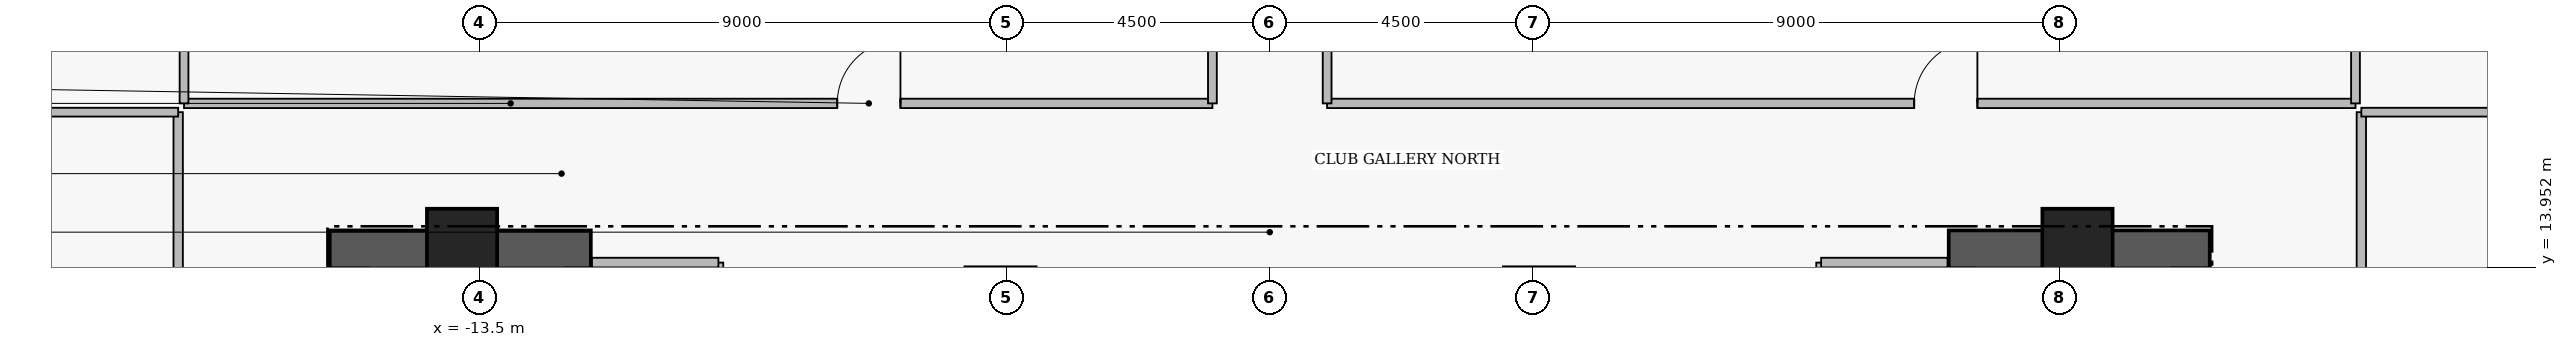
"""IFC4 building model, lengths in metres.
Left out: names, types, materials, properties, quantities, classifications, styles, units other than length and angle.
Written with IfcOpenShell. Run it as: python <this file> out.ifc"""

import sys

from ifc_helpers import new_model, si_unit, direction, frame, frame_2d, origin, origin_2d, place, context, subcontext, project, spatial, rectangle, extrude, element, fill, save


model = new_model("IFC4")
c1 = context("Model", 3, precision=1e-05, world=origin(), true_north=direction((0.0, 1.0)))
c2 = subcontext(c1, "Body", "Model", "MODEL_VIEW")
j1 = project(units=[si_unit("LENGTHUNIT", "METRE"), si_unit("PLANEANGLEUNIT", "RADIAN")], contexts=[c1])
p1 = place(None, origin())
s1 = spatial("IfcSite", under=j1, at=p1, CompositionType="ELEMENT")
p2 = place(p1, origin())
s2 = spatial("IfcBuilding", under=s1, at=p2, CompositionType="ELEMENT")
p3 = place(p2, frame((0.0, 0.0, 168.2)))
s3 = spatial("IfcBuildingStorey", under=s2, at=p3, CompositionType="ELEMENT", Elevation=168.2)
for number, where, z_axis, x_axis in (
    (1, (-16.06, 14.255, 0.0), (0.0, 0.0, 1.0), (1.0, 0.0, 0.0)),
    (2, (11.6, 14.255, 0.0), (0.0, 0.0, 1.0), (1.0, 0.0, 0.0)),
):
    element("IfcWall", number, at=place(p3, frame(where, z_axis=z_axis, x_axis=x_axis)), inside=s3, PredefinedType="SHEAR", context=c2, shape_type="SweptSolid", body=[
        extrude(rectangle(XDim=4.46, YDim=0.65, at=frame_2d((2.23, 0.0))), origin(), (0.0, 0.0, 1.0), 4.41),
    ])
for number, where, z_axis, x_axis in (
    (3, (-13.8, 14.35, 0.0), (0.0, 0.0, 1.0), (1.0, 0.0, 0.0)),
    (4, (-4.6, 13.35, 0.0), (0.0, 0.0, 1.0), (1.0, 0.0, 0.0)),
    (5, (4.6, 13.35, 0.0), (0.0, 0.0, 1.0), (1.0, 0.0, 0.0)),
    (6, (13.8, 14.35, 0.0), (0.0, 0.0, 1.0), (1.0, 0.0, 0.0)),
):
    element("IfcColumn", number, at=place(p3, frame(where, z_axis=z_axis, x_axis=x_axis)), inside=s3, PredefinedType="COLUMN", context=c2, shape_type="SweptSolid", body=[
        extrude(rectangle(XDim=1.2, YDim=1.2, at=origin_2d()), origin(), (0.0, 0.0, 1.0), 4.6),
    ])
p4 = place(p3, frame((-18.55, 16.75, 0.0), z_axis=(0.0, 0.0, 1.0), x_axis=(1.0, 0.0, 0.0)))
e7 = element("IfcWall", 7, at=p4, inside=s3, PredefinedType="PARTITIONING", context=c2, shape_type="SweptSolid", body=[
    extrude(rectangle(XDim=17.57, YDim=0.16, at=frame_2d((8.785, 0.0))), origin(), (0.0, 0.0, 1.0), 3.974),
])
p5 = place(p4, frame((11.16, 0.0, 0.0)))
e8 = element("IfcOpeningElement", 8, at=p5, cuts=e7, PredefinedType="OPENING", context=c2, shape_type="SweptSolid", body=[
    extrude(rectangle(XDim=1.08, YDim=2.18, at=frame_2d((0.54, 1.09))), frame((0.0, 0.09, 0.0), z_axis=(0.0, -1.0, 0.0), x_axis=(1.0, 0.0, 0.0)), (0.0, 0.0, 1.0), 0.18),
])
p6 = place(p3, frame((0.98, 16.75, 0.0), z_axis=(0.0, 0.0, 1.0), x_axis=(1.0, 0.0, 0.0)))
e9 = element("IfcWall", 9, at=p6, inside=s3, PredefinedType="PARTITIONING", context=c2, shape_type="SweptSolid", body=[
    extrude(rectangle(XDim=17.57, YDim=0.16, at=frame_2d((8.785, 0.0))), origin(), (0.0, 0.0, 1.0), 3.974),
])
p7 = place(p6, frame((10.03, 0.0, 0.0)))
e10 = element("IfcOpeningElement", 10, at=p7, cuts=e9, PredefinedType="OPENING", context=c2, shape_type="SweptSolid", body=[
    extrude(rectangle(XDim=1.08, YDim=2.18, at=frame_2d((0.54, 1.09))), frame((0.0, 0.09, 0.0), z_axis=(0.0, -1.0, 0.0), x_axis=(1.0, 0.0, 0.0)), (0.0, 0.0, 1.0), 0.18),
])
p8 = place(p3, frame((-18.65, 1.55, 0.0), z_axis=(0.0, 0.0, 1.0), x_axis=(0.0, 1.0, 0.0)))
e11 = element("IfcWall", 11, at=p8, inside=s3, PredefinedType="PARTITIONING", context=c2, shape_type="SweptSolid", body=[
    extrude(rectangle(XDim=15.05, YDim=0.16, at=frame_2d((7.525, 0.0))), origin(), (0.0, 0.0, 1.0), 4.38),
])
p9 = place(p8, frame((6.985, 0.0, 0.0)))
e12 = element("IfcOpeningElement", 12, at=p9, cuts=e11, PredefinedType="OPENING", context=c2, shape_type="SweptSolid", body=[
    extrude(rectangle(XDim=1.08, YDim=2.18, at=frame_2d((0.54, 1.09))), frame((0.0, 0.09, 0.0), z_axis=(0.0, -1.0, 0.0), x_axis=(1.0, 0.0, 0.0)), (0.0, 0.0, 1.0), 0.18),
])
p10 = place(p3, frame((18.65, 1.55, 0.0), z_axis=(0.0, 0.0, 1.0), x_axis=(0.0, 1.0, 0.0)))
e13 = element("IfcWall", 13, at=p10, inside=s3, PredefinedType="PARTITIONING", context=c2, shape_type="SweptSolid", body=[
    extrude(rectangle(XDim=15.05, YDim=0.16, at=frame_2d((7.525, 0.0))), origin(), (0.0, 0.0, 1.0), 4.38),
])
p11 = place(p10, frame((6.985, 0.0, 0.0)))
e14 = element("IfcOpeningElement", 14, at=p11, cuts=e13, PredefinedType="OPENING", context=c2, shape_type="SweptSolid", body=[
    extrude(rectangle(XDim=1.08, YDim=2.18, at=frame_2d((0.54, 1.09))), frame((0.0, 0.09, 0.0), z_axis=(0.0, -1.0, 0.0), x_axis=(1.0, 0.0, 0.0)), (0.0, 0.0, 1.0), 0.18),
])
p12 = place(p3, frame((-9.42, 11.07, 0.0), z_axis=(0.0, 0.0, 1.0), x_axis=(0.0, 1.0, 0.0)))
e15 = element("IfcWall", 15, at=p12, inside=s3, PredefinedType="PARTITIONING", context=c2, shape_type="SweptSolid", body=[
    extrude(rectangle(XDim=2.96, YDim=0.165, at=frame_2d((1.48, 0.0))), origin(), (0.0, 0.0, 1.0), 4.38),
])
p13 = place(p3, frame((-11.58, 14.03, 0.0), z_axis=(0.0, 0.0, 1.0), x_axis=(1.0, 0.0, 0.0)))
e16 = element("IfcWall", 16, at=p13, inside=s3, PredefinedType="PARTITIONING", context=c2, shape_type="SweptSolid", body=[
    extrude(rectangle(XDim=2.16, YDim=0.165, at=frame_2d((1.08, 0.0))), origin(), (0.0, 0.0, 1.0), 4.38),
])
p14 = place(p3, frame((9.42, 11.07, 0.0), z_axis=(0.0, 0.0, 1.0), x_axis=(0.0, 1.0, 0.0)))
e17 = element("IfcWall", 17, at=p14, inside=s3, PredefinedType="PARTITIONING", context=c2, shape_type="SweptSolid", body=[
    extrude(rectangle(XDim=2.96, YDim=0.165, at=frame_2d((1.48, 0.0))), origin(), (0.0, 0.0, 1.0), 4.38),
])
p15 = place(p3, frame((9.42, 14.03, 0.0), z_axis=(0.0, 0.0, 1.0), x_axis=(1.0, 0.0, 0.0)))
e18 = element("IfcWall", 18, at=p15, inside=s3, PredefinedType="PARTITIONING", context=c2, shape_type="SweptSolid", body=[
    extrude(rectangle(XDim=2.16, YDim=0.165, at=frame_2d((1.08, 0.0))), origin(), (0.0, 0.0, 1.0), 4.38),
])
for number, where, z_axis, x_axis in (
    (19, (-18.55, 16.75, 0.0), (0.0, 0.0, 1.0), (0.0, 1.0, 0.0)),
    (20, (-0.98, 16.75, 0.0), (0.0, 0.0, 1.0), (0.0, 1.0, 0.0)),
    (21, (0.98, 16.75, 0.0), (0.0, 0.0, 1.0), (0.0, 1.0, 0.0)),
    (22, (18.55, 16.75, 0.0), (0.0, 0.0, 1.0), (0.0, 1.0, 0.0)),
):
    element("IfcWall", number, at=place(p3, frame(where, z_axis=z_axis, x_axis=x_axis)), inside=s3, PredefinedType="PARTITIONING", context=c2, shape_type="SweptSolid", body=[
        extrude(rectangle(XDim=8.2, YDim=0.15, at=frame_2d((4.1, 0.0))), origin(), (0.0, 0.0, 1.0), 4.38),
    ])
for number, where, z_axis, x_axis in (
    (23, (-22.69, 16.6, 0.0), (0.0, 0.0, 1.0), (1.0, 0.0, 0.0)),
    (24, (18.65, 16.6, 0.0), (0.0, 0.0, 1.0), (1.0, 0.0, 0.0)),
):
    element("IfcWall", number, at=place(p3, frame(where, z_axis=z_axis, x_axis=x_axis)), inside=s3, PredefinedType="PARTITIONING", context=c2, shape_type="SweptSolid", body=[
        extrude(rectangle(XDim=4.04, YDim=0.15, at=frame_2d((2.02, 0.0))), origin(), (0.0, 0.0, 1.0), 4.38),
    ])
p16 = place(p5, origin())
e25 = element("IfcDoor", 25, at=p16, inside=s3, OperationType="SINGLE_SWING_RIGHT", PredefinedType="DOOR", context=c2, shape_type="SweptSolid", body=[
    extrude(rectangle(XDim=1.08, YDim=2.18, at=frame_2d((0.54, 1.09))), frame((0.0, 0.025, 0.0), z_axis=(0.0, -1.0, 0.0), x_axis=(1.0, 0.0, 0.0)), (0.0, 0.0, 1.0), 0.05),
])
fill(e8, e25)
p17 = place(p7, origin())
e26 = element("IfcDoor", 26, at=p17, inside=s3, OperationType="SINGLE_SWING_RIGHT", PredefinedType="DOOR", context=c2, shape_type="SweptSolid", body=[
    extrude(rectangle(XDim=1.08, YDim=2.18, at=frame_2d((0.54, 1.09))), frame((0.0, 0.025, 0.0), z_axis=(0.0, -1.0, 0.0), x_axis=(1.0, 0.0, 0.0)), (0.0, 0.0, 1.0), 0.05),
])
fill(e10, e26)
save(model, sys.argv[1])
